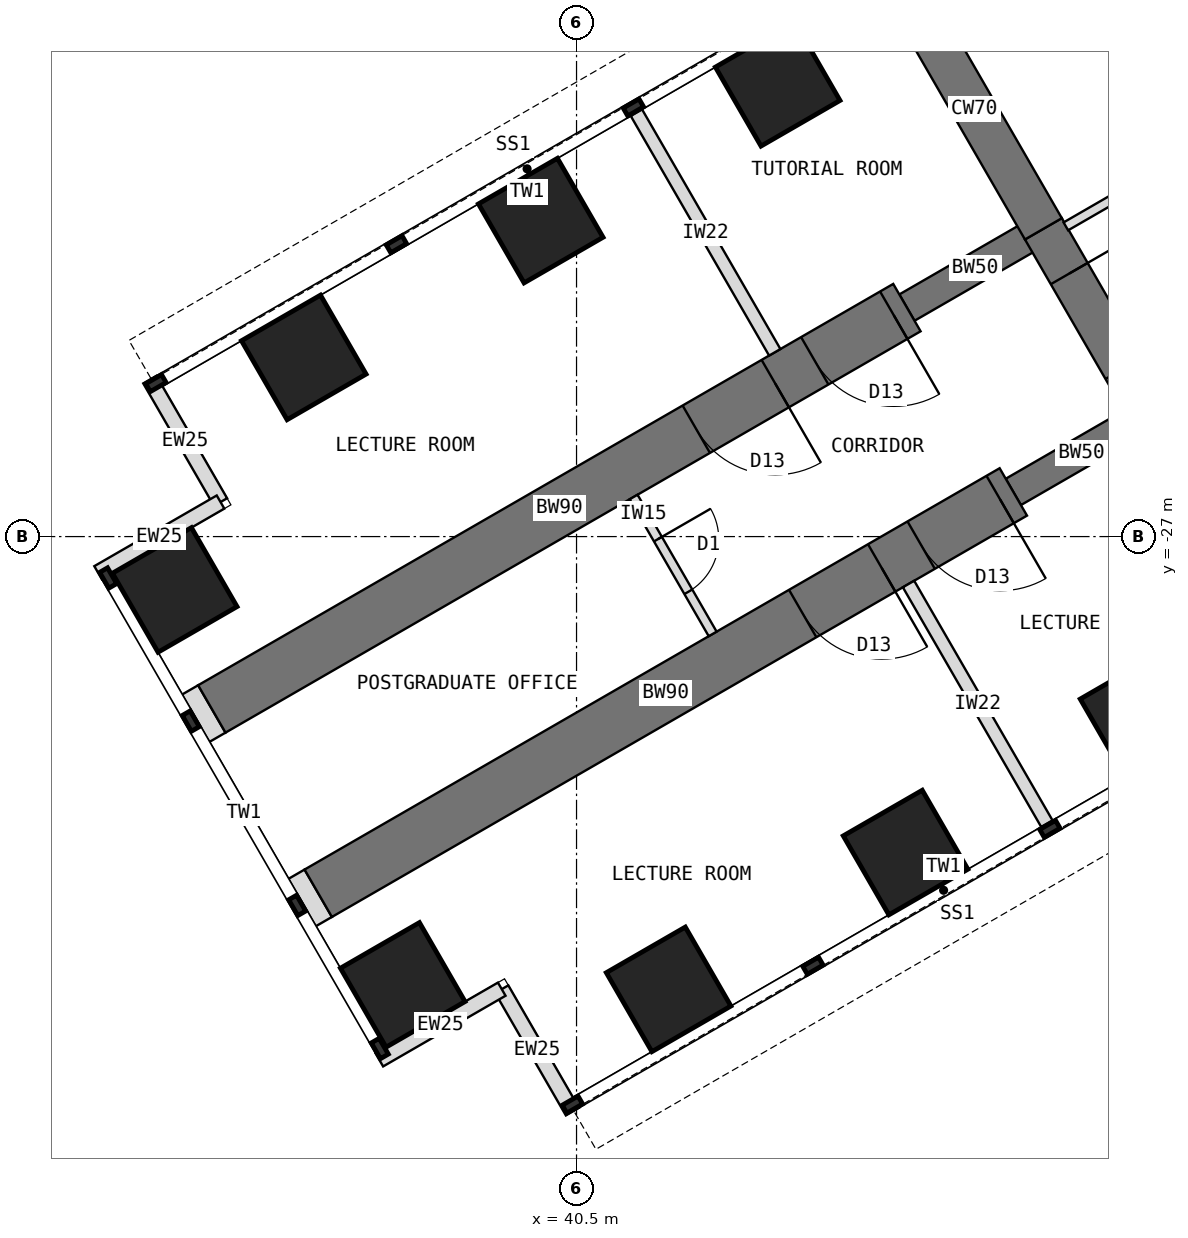
"""IFC4 building model, lengths in metres.
Left out: names, types, materials, properties, quantities, classifications, styles, units other than length and angle.
Written with IfcOpenShell. Run it as: python <this file> out.ifc"""

import sys

from ifc_helpers import new_model, si_unit, direction, frame, frame_2d, origin, origin_2d, place, context, subcontext, project, spatial, rectangle, extrude, element, fill, save


model = new_model("IFC4")
c1 = context("Model", 3, precision=1e-05, world=origin(), true_north=direction((0.0, 1.0)))
c2 = subcontext(c1, "Body", "Model", "MODEL_VIEW")
j1 = project(units=[si_unit("LENGTHUNIT", "METRE"), si_unit("PLANEANGLEUNIT", "RADIAN")], contexts=[c1])
p1 = place(None, origin())
s1 = spatial("IfcSite", under=j1, at=p1, CompositionType="ELEMENT")
p2 = place(p1, origin())
s2 = spatial("IfcBuilding", under=s1, at=p2, CompositionType="ELEMENT")
p3 = place(p2, frame((0.0, 0.0, 28.5)))
s3 = spatial("IfcBuildingStorey", under=s2, at=p3, CompositionType="ELEMENT", Elevation=28.5)
p4 = place(p3, frame((45.904, -18.0, 0.0), z_axis=(0.0, 0.0, 1.0), x_axis=(0.500024481964, -0.866011268655, 0.0)))
e1 = element("IfcWall", 1, at=p4, inside=s3, PredefinedType="SHEAR", context=c2, shape_type="SweptSolid", body=[
    extrude(rectangle(XDim=4.548, YDim=0.7, at=frame_2d((2.274, 0.0))), origin(), (0.0, 0.0, 1.0), 4.0),
])
p5 = place(p3, frame((48.178, -21.939, 0.0), z_axis=(0.0, 0.0, 1.0), x_axis=(0.500010275428, -0.866019471182, 0.0)))
e2 = element("IfcWall", 2, at=p5, inside=s3, PredefinedType="SHEAR", context=c2, shape_type="SweptSolid", body=[
    extrude(rectangle(XDim=3.5, YDim=0.7, at=frame_2d((1.75, 0.0))), origin(), (0.0, 0.0, 1.0), 4.0),
])
p6 = place(p5, frame((0.85, 0.0, 0.0)))
e3 = element("IfcOpeningElement", 3, at=p6, cuts=e2, PredefinedType="OPENING", context=c2, shape_type="SweptSolid", body=[
    extrude(rectangle(XDim=1.8, YDim=2.1, at=frame_2d((0.9, 1.05))), frame((0.0, 0.36, 0.0), z_axis=(0.0, -1.0, 0.0), x_axis=(1.0, 0.0, 0.0)), (0.0, 0.0, 1.0), 0.72),
])
p7 = place(p3, frame((49.928, -24.97, 0.0), z_axis=(0.0, 0.0, 1.0), x_axis=(-0.866031863473, -0.499988811324, 0.0)))
e4 = element("IfcWall", 4, at=p7, inside=s3, PredefinedType="SHEAR", context=c2, shape_type="SweptSolid", body=[
    extrude(rectangle(XDim=2.592, YDim=0.5, at=frame_2d((1.296, 0.0))), origin(), (0.0, 0.0, 1.0), 4.0),
])
p8 = place(p3, frame((47.684, -26.266, 0.0), z_axis=(0.0, 0.0, 1.0), x_axis=(-0.866027579429, -0.499996231654, 0.0)))
e5 = element("IfcWall", 5, at=p8, inside=s3, PredefinedType="SHEAR", context=c2, shape_type="SweptSolid", body=[
    extrude(rectangle(XDim=13.2, YDim=0.9, at=frame_2d((6.6, 0.0))), origin(), (0.0, 0.0, 1.0), 4.0),
])
p9 = place(p8, frame((0.25, 0.0, 0.0)))
e6 = element("IfcOpeningElement", 6, at=p9, cuts=e5, PredefinedType="OPENING", context=c2, shape_type="SweptSolid", body=[
    extrude(rectangle(XDim=1.5, YDim=2.1, at=frame_2d((0.75, 1.05))), frame((0.0, 0.46, 0.0), z_axis=(0.0, -1.0, 0.0), x_axis=(1.0, 0.0, 0.0)), (0.0, 0.0, 1.0), 0.92),
])
p10 = place(p8, frame((2.5, 0.0, 0.0)))
e7 = element("IfcOpeningElement", 7, at=p10, cuts=e5, PredefinedType="OPENING", context=c2, shape_type="SweptSolid", body=[
    extrude(rectangle(XDim=1.5, YDim=2.1, at=frame_2d((0.75, 1.05))), frame((0.0, 0.46, 0.0), z_axis=(0.0, -1.0, 0.0), x_axis=(1.0, 0.0, 0.0)), (0.0, 0.0, 1.0), 0.92),
])
p11 = place(p3, frame((48.178, -21.939, 0.0), z_axis=(0.0, 0.0, 1.0), x_axis=(-0.866072649678, -0.499918158782, 0.0)))
e8 = element("IfcWall", 8, at=p11, inside=s3, PredefinedType="SHEAR", context=c2, shape_type="SweptSolid", body=[
    extrude(rectangle(XDim=2.592, YDim=0.5, at=frame_2d((1.296, 0.0))), origin(), (0.0, 0.0, 1.0), 4.0),
])
p12 = place(p3, frame((45.934, -23.234, 0.0), z_axis=(0.0, 0.0, 1.0), x_axis=(-0.866019570528, -0.500010103361, 0.0)))
e9 = element("IfcWall", 9, at=p12, inside=s3, PredefinedType="SHEAR", context=c2, shape_type="SweptSolid", body=[
    extrude(rectangle(XDim=13.2, YDim=0.9, at=frame_2d((6.6, 0.0))), origin(), (0.0, 0.0, 1.0), 4.0),
])
p13 = place(p12, frame((0.25, 0.0, 0.0)))
e10 = element("IfcOpeningElement", 10, at=p13, cuts=e9, PredefinedType="OPENING", context=c2, shape_type="SweptSolid", body=[
    extrude(rectangle(XDim=1.5, YDim=2.1, at=frame_2d((0.75, 1.05))), frame((0.0, 0.46, 0.0), z_axis=(0.0, -1.0, 0.0), x_axis=(1.0, 0.0, 0.0)), (0.0, 0.0, 1.0), 0.92),
])
p14 = place(p12, frame((2.5, 0.0, 0.0)))
e11 = element("IfcOpeningElement", 11, at=p14, cuts=e9, PredefinedType="OPENING", context=c2, shape_type="SweptSolid", body=[
    extrude(rectangle(XDim=1.5, YDim=2.1, at=frame_2d((0.75, 1.05))), frame((0.0, 0.46, 0.0), z_axis=(0.0, -1.0, 0.0), x_axis=(1.0, 0.0, 0.0)), (0.0, 0.0, 1.0), 0.92),
])
for number, where, z_axis, x_axis in (
    (12, (49.809, -29.946, 0.0), (0.0, 0.0, 1.0), (0.866, 0.5, 0.0)),
    (13, (43.809, -19.554, 0.0), (0.0, 0.0, 1.0), (0.866, 0.5, 0.0)),
    (14, (45.912, -32.196, 0.0), (0.0, 0.0, 1.0), (0.866, 0.5, 0.0)),
    (15, (39.912, -21.804, 0.0), (0.0, 0.0, 1.0), (0.866, 0.5, 0.0)),
    (16, (42.014, -34.446, 0.0), (0.0, 0.0, 1.0), (0.866, 0.5, 0.0)),
    (17, (36.014, -24.054, 0.0), (0.0, 0.0, 1.0), (0.866, 0.5, 0.0)),
    (18, (37.642, -34.373, 0.0), (0.0, 0.0, 1.0), (0.866, 0.5, 0.0)),
    (19, (33.892, -27.877, 0.0), (0.0, 0.0, 1.0), (0.866, 0.5, 0.0)),
):
    element("IfcColumn", number, at=place(p3, frame(where, z_axis=z_axis, x_axis=x_axis)), inside=s3, PredefinedType="COLUMN", context=c2, shape_type="SweptSolid", body=[
        extrude(rectangle(XDim=1.5, YDim=1.5, at=origin_2d()), origin(), (0.0, 0.0, 1.0), 4.0),
    ])
for number, where, z_axis, x_axis in (
    (20, (40.433, -36.456, 0.0), (0.0, 0.0, 1.0), (-0.5, 0.866, 0.0)),
    (21, (39.27, -34.443, 0.0), (0.0, 0.0, 1.0), (-0.866, -0.5, 0.0)),
    (22, (33.483, -24.419, 0.0), (0.0, 0.0, 1.0), (0.5, -0.866, 0.0)),
    (23, (34.645, -26.432, 0.0), (0.0, 0.0, 1.0), (-0.866, -0.5, 0.0)),
):
    element("IfcWall", number, at=place(p3, frame(where, z_axis=z_axis, x_axis=x_axis)), inside=s3, PredefinedType="STANDARD", context=c2, shape_type="SweptSolid", body=[
        extrude(rectangle(XDim=2.325, YDim=0.25, at=frame_2d((1.163, 0.0))), origin(), (0.0, 0.0, 1.0), 3.8),
    ])
for number, where, z_axis, x_axis in (
    (24, (36.252, -32.865, 0.0), (0.0, 0.0, 1.0), (-0.866, -0.5, 0.0)),
    (25, (34.502, -29.834, 0.0), (0.0, 0.0, 1.0), (-0.866, -0.5, 0.0)),
):
    element("IfcWall", number, at=place(p3, frame(where, z_axis=z_axis, x_axis=x_axis)), inside=s3, PredefinedType="PARTITIONING", context=c2, shape_type="SweptSolid", body=[
        extrude(rectangle(XDim=0.31, YDim=0.9, at=frame_2d((0.155, 0.0))), origin(), (0.0, 0.0, 1.0), 3.8),
    ])
p15 = place(p3, frame((52.38, -19.201, 0.0), z_axis=(0.0, 0.0, 1.0), x_axis=(-0.866023886965, 0.500002627198, 0.0)))
e26 = element("IfcWall", 26, at=p15, inside=s3, PredefinedType="SHEAR", context=c2, shape_type="SweptSolid", body=[
    extrude(rectangle(XDim=5.858, YDim=0.4, at=frame_2d((2.929, 0.0))), origin(), (0.0, 0.0, 1.0), 4.0),
])
for number, where, z_axis, x_axis in (
    (27, (45.96, -27.78, 0.0), (0.0, 0.0, 1.0), (0.5, -0.866, 0.0)),
    (28, (43.76, -23.97, 0.0), (0.0, 0.0, 1.0), (-0.5, 0.866, 0.0)),
):
    element("IfcWall", number, at=place(p3, frame(where, z_axis=z_axis, x_axis=x_axis)), inside=s3, PredefinedType="PARTITIONING", context=c2, shape_type="SweptSolid", body=[
        extrude(rectangle(XDim=4.55, YDim=0.215, at=frame_2d((2.275, 0.0))), origin(), (0.0, 0.0, 1.0), 3.8),
    ])
p16 = place(p3, frame((48.548, -21.898, 0.0), z_axis=(0.0, 0.0, 1.0), x_axis=(0.866025445582, 0.499999927604, 0.0)))
e29 = element("IfcWall", 29, at=p16, inside=s3, PredefinedType="PARTITIONING", context=c2, shape_type="SweptSolid", body=[
    extrude(rectangle(XDim=4.468, YDim=0.15, at=frame_2d((2.234, 0.0))), origin(), (0.0, 0.0, 1.0), 3.8),
])
p17 = place(p16, frame((1.724, 0.0, 0.0)))
e30 = element("IfcOpeningElement", 30, at=p17, cuts=e29, PredefinedType="OPENING", context=c2, shape_type="SweptSolid", body=[
    extrude(rectangle(XDim=1.0, YDim=2.1, at=frame_2d((0.5, 1.05))), frame((0.0, 0.085, 0.0), z_axis=(0.0, -1.0, 0.0), x_axis=(1.0, 0.0, 0.0)), (0.0, 0.0, 1.0), 0.17),
])
p18 = place(p3, frame((41.439, -26.349, 0.0), z_axis=(0.0, 0.0, 1.0), x_axis=(0.500006934395, -0.866021400173, 0.0)))
e31 = element("IfcWall", 31, at=p18, inside=s3, PredefinedType="PARTITIONING", context=c2, shape_type="SweptSolid", body=[
    extrude(rectangle(XDim=2.6, YDim=0.15, at=frame_2d((1.3, 0.0))), origin(), (0.0, 0.0, 1.0), 3.8),
])
p19 = place(p18, frame((0.8, 0.0, 0.0)))
e32 = element("IfcOpeningElement", 32, at=p19, cuts=e31, PredefinedType="OPENING", context=c2, shape_type="SweptSolid", body=[
    extrude(rectangle(XDim=1.0, YDim=2.1, at=frame_2d((0.5, 1.05))), frame((0.0, 0.085, 0.0), z_axis=(0.0, -1.0, 0.0), x_axis=(1.0, 0.0, 0.0)), (0.0, 0.0, 1.0), 0.17),
])
p20 = place(p6, origin())
e33 = element("IfcDoor", 33, at=p20, inside=s3, OperationType="DOUBLE_DOOR_DOUBLE_SWING", PredefinedType="DOOR", context=c2, shape_type="SweptSolid", body=[
    extrude(rectangle(XDim=1.72, YDim=2.06, at=frame_2d((0.9, 1.03))), frame((0.0, 0.025, 0.0), z_axis=(0.0, -1.0, 0.0), x_axis=(1.0, 0.0, 0.0)), (0.0, 0.0, 1.0), 0.05),
    extrude(rectangle(XDim=0.04, YDim=2.1, at=frame_2d((0.02, 1.05))), frame((0.0, 0.35, 0.0), z_axis=(0.0, -1.0, 0.0), x_axis=(1.0, 0.0, 0.0)), (0.0, 0.0, 1.0), 0.699),
    extrude(rectangle(XDim=0.04, YDim=2.1, at=frame_2d((1.78, 1.05))), frame((0.0, 0.35, 0.0), z_axis=(0.0, -1.0, 0.0), x_axis=(1.0, 0.0, 0.0)), (0.0, 0.0, 1.0), 0.699),
    extrude(rectangle(XDim=1.72, YDim=0.04, at=frame_2d((0.9, 2.08))), frame((0.0, 0.35, 0.0), z_axis=(0.0, -1.0, 0.0), x_axis=(1.0, 0.0, 0.0)), (0.0, 0.0, 1.0), 0.699),
])
fill(e3, e33)
p21 = place(p19, origin())
e34 = element("IfcDoor", 34, at=p21, inside=s3, OperationType="SINGLE_SWING_LEFT", PredefinedType="DOOR", context=c2, shape_type="SweptSolid", body=[
    extrude(rectangle(XDim=1.0, YDim=2.1, at=frame_2d((0.5, 1.05))), frame((0.0, 0.025, 0.0), z_axis=(0.0, -1.0, 0.0), x_axis=(1.0, 0.0, 0.0)), (0.0, 0.0, 1.0), 0.05),
])
fill(e32, e34)
p22 = place(p9, origin())
e35 = element("IfcDoor", 35, at=p22, inside=s3, OperationType="DOUBLE_DOOR_SINGLE_SWING", PredefinedType="DOOR", context=c2, shape_type="SweptSolid", body=[
    extrude(rectangle(XDim=1.42, YDim=2.06, at=frame_2d((0.75, 1.03))), frame((0.0, 0.025, 0.0), z_axis=(0.0, -1.0, 0.0), x_axis=(1.0, 0.0, 0.0)), (0.0, 0.0, 1.0), 0.05),
    extrude(rectangle(XDim=0.04, YDim=2.1, at=frame_2d((0.02, 1.05))), frame((0.0, 0.45, 0.0), z_axis=(0.0, -1.0, 0.0), x_axis=(1.0, 0.0, 0.0)), (0.0, 0.0, 1.0), 0.899),
    extrude(rectangle(XDim=0.04, YDim=2.1, at=frame_2d((1.48, 1.05))), frame((0.0, 0.45, 0.0), z_axis=(0.0, -1.0, 0.0), x_axis=(1.0, 0.0, 0.0)), (0.0, 0.0, 1.0), 0.899),
    extrude(rectangle(XDim=1.42, YDim=0.04, at=frame_2d((0.75, 2.08))), frame((0.0, 0.45, 0.0), z_axis=(0.0, -1.0, 0.0), x_axis=(1.0, 0.0, 0.0)), (0.0, 0.0, 1.0), 0.899),
])
fill(e6, e35)
p23 = place(p10, origin())
e36 = element("IfcDoor", 36, at=p23, inside=s3, OperationType="DOUBLE_DOOR_SINGLE_SWING", PredefinedType="DOOR", context=c2, shape_type="SweptSolid", body=[
    extrude(rectangle(XDim=1.42, YDim=2.06, at=frame_2d((0.75, 1.03))), frame((0.0, 0.025, 0.0), z_axis=(0.0, -1.0, 0.0), x_axis=(1.0, 0.0, 0.0)), (0.0, 0.0, 1.0), 0.05),
    extrude(rectangle(XDim=0.04, YDim=2.1, at=frame_2d((0.02, 1.05))), frame((0.0, 0.45, 0.0), z_axis=(0.0, -1.0, 0.0), x_axis=(1.0, 0.0, 0.0)), (0.0, 0.0, 1.0), 0.899),
    extrude(rectangle(XDim=0.04, YDim=2.1, at=frame_2d((1.48, 1.05))), frame((0.0, 0.45, 0.0), z_axis=(0.0, -1.0, 0.0), x_axis=(1.0, 0.0, 0.0)), (0.0, 0.0, 1.0), 0.899),
    extrude(rectangle(XDim=1.42, YDim=0.04, at=frame_2d((0.75, 2.08))), frame((0.0, 0.45, 0.0), z_axis=(0.0, -1.0, 0.0), x_axis=(1.0, 0.0, 0.0)), (0.0, 0.0, 1.0), 0.899),
])
fill(e7, e36)
p24 = place(p13, origin())
e37 = element("IfcDoor", 37, at=p24, inside=s3, OperationType="DOUBLE_DOOR_SINGLE_SWING", PredefinedType="DOOR", context=c2, shape_type="SweptSolid", body=[
    extrude(rectangle(XDim=1.42, YDim=2.06, at=frame_2d((0.75, 1.03))), frame((0.0, 0.025, 0.0), z_axis=(0.0, -1.0, 0.0), x_axis=(1.0, 0.0, 0.0)), (0.0, 0.0, 1.0), 0.05),
    extrude(rectangle(XDim=0.04, YDim=2.1, at=frame_2d((0.02, 1.05))), frame((0.0, 0.45, 0.0), z_axis=(0.0, -1.0, 0.0), x_axis=(1.0, 0.0, 0.0)), (0.0, 0.0, 1.0), 0.899),
    extrude(rectangle(XDim=0.04, YDim=2.1, at=frame_2d((1.48, 1.05))), frame((0.0, 0.45, 0.0), z_axis=(0.0, -1.0, 0.0), x_axis=(1.0, 0.0, 0.0)), (0.0, 0.0, 1.0), 0.899),
    extrude(rectangle(XDim=1.42, YDim=0.04, at=frame_2d((0.75, 2.08))), frame((0.0, 0.45, 0.0), z_axis=(0.0, -1.0, 0.0), x_axis=(1.0, 0.0, 0.0)), (0.0, 0.0, 1.0), 0.899),
])
fill(e10, e37)
p25 = place(p14, origin())
e38 = element("IfcDoor", 38, at=p25, inside=s3, OperationType="DOUBLE_DOOR_SINGLE_SWING", PredefinedType="DOOR", context=c2, shape_type="SweptSolid", body=[
    extrude(rectangle(XDim=1.42, YDim=2.06, at=frame_2d((0.75, 1.03))), frame((0.0, 0.025, 0.0), z_axis=(0.0, -1.0, 0.0), x_axis=(1.0, 0.0, 0.0)), (0.0, 0.0, 1.0), 0.05),
    extrude(rectangle(XDim=0.04, YDim=2.1, at=frame_2d((0.02, 1.05))), frame((0.0, 0.45, 0.0), z_axis=(0.0, -1.0, 0.0), x_axis=(1.0, 0.0, 0.0)), (0.0, 0.0, 1.0), 0.899),
    extrude(rectangle(XDim=0.04, YDim=2.1, at=frame_2d((1.48, 1.05))), frame((0.0, 0.45, 0.0), z_axis=(0.0, -1.0, 0.0), x_axis=(1.0, 0.0, 0.0)), (0.0, 0.0, 1.0), 0.899),
    extrude(rectangle(XDim=1.42, YDim=0.04, at=frame_2d((0.75, 2.08))), frame((0.0, 0.45, 0.0), z_axis=(0.0, -1.0, 0.0), x_axis=(1.0, 0.0, 0.0)), (0.0, 0.0, 1.0), 0.899),
])
fill(e11, e38)
save(model, sys.argv[1])
